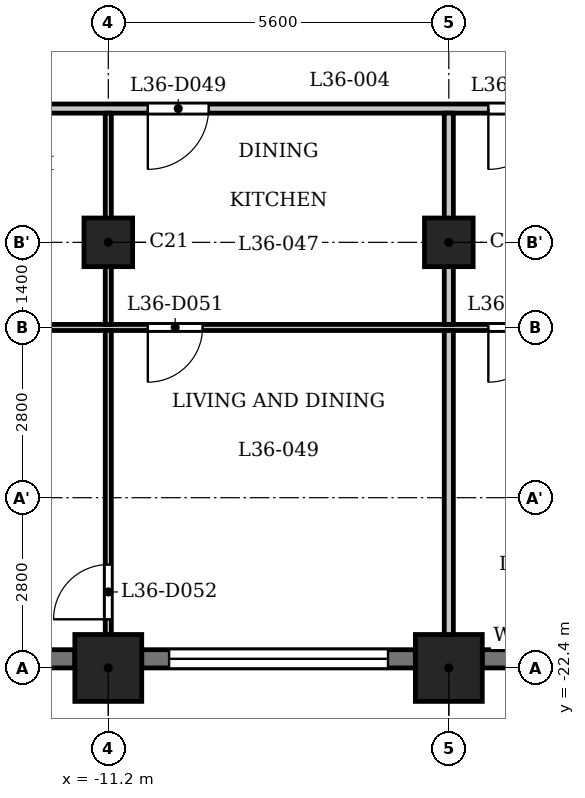
"""IFC4 building model, lengths in metres.
Left out: names, types, materials, properties, quantities, classifications, styles, units other than length and angle.
Written with IfcOpenShell. Run it as: python <this file> out.ifc"""

import sys

from ifc_helpers import new_model, si_unit, direction, frame, frame_2d, origin, origin_2d, place, context, subcontext, project, spatial, rectangle, extrude, element, fill, save


model = new_model("IFC4")
c1 = context("Model", 3, precision=1e-05, world=origin(), true_north=direction((0.0, 1.0)))
c2 = subcontext(c1, "Body", "Model", "MODEL_VIEW")
j1 = project(units=[si_unit("LENGTHUNIT", "METRE"), si_unit("PLANEANGLEUNIT", "RADIAN")], contexts=[c1])
p1 = place(None, origin())
s1 = spatial("IfcSite", under=j1, at=p1, CompositionType="ELEMENT")
p2 = place(p1, origin())
s2 = spatial("IfcBuilding", under=s1, at=p2, CompositionType="ELEMENT")
p3 = place(p2, frame((0.0, 0.0, 143.1)))
s3 = spatial("IfcBuildingStorey", under=s2, at=p3, CompositionType="ELEMENT", Elevation=143.1)
for number, where, z_axis, x_axis in (
    (1, (-11.2, -22.4, 0.0), (0.0, 0.0, 1.0), (1.0, 0.0, 0.0)),
    (2, (-5.6, -22.4, 0.0), (0.0, 0.0, 1.0), (1.0, 0.0, 0.0)),
):
    element("IfcColumn", number, at=place(p3, frame(where, z_axis=z_axis, x_axis=x_axis)), inside=s3, PredefinedType="COLUMN", context=c2, shape_type="SweptSolid", body=[
        extrude(rectangle(XDim=1.1, YDim=1.1, at=origin_2d()), origin(), (0.0, 0.0, 1.0), 3.5),
    ])
for number, where, z_axis, x_axis in (
    (3, (-11.2, -15.4, 0.0), (0.0, 0.0, 1.0), (1.0, 0.0, 0.0)),
    (4, (-5.6, -15.4, 0.0), (0.0, 0.0, 1.0), (1.0, 0.0, 0.0)),
):
    element("IfcColumn", number, at=place(p3, frame(where, z_axis=z_axis, x_axis=x_axis)), inside=s3, PredefinedType="COLUMN", context=c2, shape_type="SweptSolid", body=[
        extrude(rectangle(XDim=0.8, YDim=0.8, at=origin_2d()), origin(), (0.0, 0.0, 1.0), 3.5),
    ])
p4 = place(p3, frame((-16.25, -22.25, 0.0), z_axis=(0.0, 0.0, 1.0), x_axis=(1.0, 0.0, 0.0)))
e5 = element("IfcWall", 5, at=p4, inside=s3, PredefinedType="SOLIDWALL", context=c2, shape_type="SweptSolid", body=[
    extrude(rectangle(XDim=4.5, YDim=0.3, at=frame_2d((2.25, 0.0))), origin(), (0.0, 0.0, 1.0), 2.45),
])
p5 = place(p4, frame((0.45, 0.0, 1.2)))
e6 = element("IfcOpeningElement", 6, at=p5, cuts=e5, PredefinedType="OPENING", context=c2, shape_type="SweptSolid", body=[
    extrude(rectangle(XDim=3.6, YDim=0.95, at=frame_2d((1.8, 0.475))), frame((0.0, 0.16, 0.0), z_axis=(0.0, -1.0, 0.0), x_axis=(1.0, 0.0, 0.0)), (0.0, 0.0, 1.0), 0.32),
])
p6 = place(p3, frame((-10.65, -22.25, 0.0), z_axis=(0.0, 0.0, 1.0), x_axis=(1.0, 0.0, 0.0)))
e7 = element("IfcWall", 7, at=p6, inside=s3, PredefinedType="SOLIDWALL", context=c2, shape_type="SweptSolid", body=[
    extrude(rectangle(XDim=4.5, YDim=0.3, at=frame_2d((2.25, 0.0))), origin(), (0.0, 0.0, 1.0), 2.45),
])
p7 = place(p6, frame((0.45, 0.0, 1.2)))
e8 = element("IfcOpeningElement", 8, at=p7, cuts=e7, PredefinedType="OPENING", context=c2, shape_type="SweptSolid", body=[
    extrude(rectangle(XDim=3.6, YDim=0.95, at=frame_2d((1.8, 0.475))), frame((0.0, 0.16, 0.0), z_axis=(0.0, -1.0, 0.0), x_axis=(1.0, 0.0, 0.0)), (0.0, 0.0, 1.0), 0.32),
])
p8 = place(p3, frame((-5.05, -22.25, 0.0), z_axis=(0.0, 0.0, 1.0), x_axis=(1.0, 0.0, 0.0)))
e9 = element("IfcWall", 9, at=p8, inside=s3, PredefinedType="SOLIDWALL", context=c2, shape_type="SweptSolid", body=[
    extrude(rectangle(XDim=4.5, YDim=0.3, at=frame_2d((2.25, 0.0))), origin(), (0.0, 0.0, 1.0), 2.45),
])
p9 = place(p8, frame((0.45, 0.0, 1.2)))
e10 = element("IfcOpeningElement", 10, at=p9, cuts=e9, PredefinedType="OPENING", context=c2, shape_type="SweptSolid", body=[
    extrude(rectangle(XDim=3.6, YDim=0.95, at=frame_2d((1.8, 0.475))), frame((0.0, 0.16, 0.0), z_axis=(0.0, -1.0, 0.0), x_axis=(1.0, 0.0, 0.0)), (0.0, 0.0, 1.0), 0.32),
])
p10 = place(p3, frame((-16.725, -16.8, 0.0), z_axis=(0.0, 0.0, 1.0), x_axis=(1.0, 0.0, 0.0)))
e11 = element("IfcWall", 11, at=p10, inside=s3, PredefinedType="PARTITIONING", context=c2, shape_type="SweptSolid", body=[
    extrude(rectangle(XDim=33.45, YDim=0.1, at=frame_2d((16.725, 0.0))), origin(), (0.0, 0.0, 1.0), 3.2),
])
p11 = place(p10, frame((0.575, 0.0, 0.0)))
e12 = element("IfcOpeningElement", 12, at=p11, cuts=e11, PredefinedType="OPENING", context=c2, shape_type="SweptSolid", body=[
    extrude(rectangle(XDim=0.8, YDim=2.1, at=frame_2d((0.4, 1.05))), frame((0.0, 0.06, 0.0), z_axis=(0.0, -1.0, 0.0), x_axis=(1.0, 0.0, 0.0)), (0.0, 0.0, 1.0), 0.12),
])
p12 = place(p10, frame((6.175, 0.0, 0.0)))
e13 = element("IfcOpeningElement", 13, at=p12, cuts=e11, PredefinedType="OPENING", context=c2, shape_type="SweptSolid", body=[
    extrude(rectangle(XDim=0.9, YDim=2.1, at=frame_2d((0.45, 1.05))), frame((0.0, 0.06, 0.0), z_axis=(0.0, -1.0, 0.0), x_axis=(1.0, 0.0, 0.0)), (0.0, 0.0, 1.0), 0.12),
])
p13 = place(p10, frame((15.275, 0.0, 0.0)))
e14 = element("IfcOpeningElement", 14, at=p13, cuts=e11, PredefinedType="OPENING", context=c2, shape_type="SweptSolid", body=[
    extrude(rectangle(XDim=0.8, YDim=2.1, at=frame_2d((0.4, 1.05))), frame((0.0, 0.06, 0.0), z_axis=(0.0, -1.0, 0.0), x_axis=(1.0, 0.0, 0.0)), (0.0, 0.0, 1.0), 0.12),
])
p14 = place(p10, frame((11.775, 0.0, 0.0)))
e15 = element("IfcOpeningElement", 15, at=p14, cuts=e11, PredefinedType="OPENING", context=c2, shape_type="SweptSolid", body=[
    extrude(rectangle(XDim=0.9, YDim=2.1, at=frame_2d((0.45, 1.05))), frame((0.0, 0.06, 0.0), z_axis=(0.0, -1.0, 0.0), x_axis=(1.0, 0.0, 0.0)), (0.0, 0.0, 1.0), 0.12),
])
p15 = place(p10, frame((17.275, 0.0, 0.0)))
e16 = element("IfcOpeningElement", 16, at=p15, cuts=e11, PredefinedType="OPENING", context=c2, shape_type="SweptSolid", body=[
    extrude(rectangle(XDim=0.8, YDim=2.1, at=frame_2d((0.4, 1.05))), frame((0.0, 0.06, 0.0), z_axis=(0.0, -1.0, 0.0), x_axis=(1.0, 0.0, 0.0)), (0.0, 0.0, 1.0), 0.12),
])
p16 = place(p10, frame((20.775, 0.0, 0.0)))
e17 = element("IfcOpeningElement", 17, at=p16, cuts=e11, PredefinedType="OPENING", context=c2, shape_type="SweptSolid", body=[
    extrude(rectangle(XDim=0.9, YDim=2.1, at=frame_2d((0.45, 1.05))), frame((0.0, 0.06, 0.0), z_axis=(0.0, -1.0, 0.0), x_axis=(1.0, 0.0, 0.0)), (0.0, 0.0, 1.0), 0.12),
])
p17 = place(p10, frame((31.575, 0.0, 0.0)))
e18 = element("IfcOpeningElement", 18, at=p17, cuts=e11, PredefinedType="OPENING", context=c2, shape_type="SweptSolid", body=[
    extrude(rectangle(XDim=0.8, YDim=2.1, at=frame_2d((0.4, 1.05))), frame((0.0, 0.06, 0.0), z_axis=(0.0, -1.0, 0.0), x_axis=(1.0, 0.0, 0.0)), (0.0, 0.0, 1.0), 0.12),
])
p18 = place(p10, frame((28.575, 0.0, 0.0)))
e19 = element("IfcOpeningElement", 19, at=p18, cuts=e11, PredefinedType="OPENING", context=c2, shape_type="SweptSolid", body=[
    extrude(rectangle(XDim=0.9, YDim=2.1, at=frame_2d((0.45, 1.05))), frame((0.0, 0.06, 0.0), z_axis=(0.0, -1.0, 0.0), x_axis=(1.0, 0.0, 0.0)), (0.0, 0.0, 1.0), 0.12),
])
p19 = place(p10, frame((23.725, 0.0, 0.0)))
e20 = element("IfcOpeningElement", 20, at=p19, cuts=e11, PredefinedType="OPENING", context=c2, shape_type="SweptSolid", body=[
    extrude(rectangle(XDim=0.9, YDim=2.1, at=frame_2d((0.45, 1.05))), frame((0.0, 0.06, 0.0), z_axis=(0.0, -1.0, 0.0), x_axis=(1.0, 0.0, 0.0)), (0.0, 0.0, 1.0), 0.12),
])
p20 = place(p10, frame((26.225, 0.0, 0.0)))
e21 = element("IfcOpeningElement", 21, at=p20, cuts=e11, PredefinedType="OPENING", context=c2, shape_type="SweptSolid", body=[
    extrude(rectangle(XDim=0.9, YDim=2.1, at=frame_2d((0.45, 1.05))), frame((0.0, 0.06, 0.0), z_axis=(0.0, -1.0, 0.0), x_axis=(1.0, 0.0, 0.0)), (0.0, 0.0, 1.0), 0.12),
])
p21 = place(p3, frame((-17.4, -13.2, 0.0), z_axis=(0.0, 0.0, 1.0), x_axis=(1.0, 0.0, 0.0)))
e22 = element("IfcWall", 22, at=p21, inside=s3, PredefinedType="PARTITIONING", context=c2, shape_type="SweptSolid", body=[
    extrude(rectangle(XDim=34.8, YDim=0.15, at=frame_2d((17.4, 0.0))), origin(), (0.0, 0.0, 1.0), 3.2),
])
p22 = place(p21, frame((0.15, 0.0, 0.0)))
e23 = element("IfcOpeningElement", 23, at=p22, cuts=e22, PredefinedType="OPENING", context=c2, shape_type="SweptSolid", body=[
    extrude(rectangle(XDim=1.0, YDim=2.1, at=frame_2d((0.5, 1.05))), frame((0.0, 0.085, 0.0), z_axis=(0.0, -1.0, 0.0), x_axis=(1.0, 0.0, 0.0)), (0.0, 0.0, 1.0), 0.17),
])
p23 = place(p21, frame((33.55, 0.0, 0.0)))
e24 = element("IfcOpeningElement", 24, at=p23, cuts=e22, PredefinedType="OPENING", context=c2, shape_type="SweptSolid", body=[
    extrude(rectangle(XDim=1.0, YDim=2.1, at=frame_2d((0.5, 1.05))), frame((0.0, 0.085, 0.0), z_axis=(0.0, -1.0, 0.0), x_axis=(1.0, 0.0, 0.0)), (0.0, 0.0, 1.0), 0.17),
])
p24 = place(p21, frame((6.85, 0.0, 0.0)))
e25 = element("IfcOpeningElement", 25, at=p24, cuts=e22, PredefinedType="OPENING", context=c2, shape_type="SweptSolid", body=[
    extrude(rectangle(XDim=1.0, YDim=2.1, at=frame_2d((0.5, 1.05))), frame((0.0, 0.085, 0.0), z_axis=(0.0, -1.0, 0.0), x_axis=(1.0, 0.0, 0.0)), (0.0, 0.0, 1.0), 0.17),
])
p25 = place(p21, frame((12.45, 0.0, 0.0)))
e26 = element("IfcOpeningElement", 26, at=p25, cuts=e22, PredefinedType="OPENING", context=c2, shape_type="SweptSolid", body=[
    extrude(rectangle(XDim=1.0, YDim=2.1, at=frame_2d((0.5, 1.05))), frame((0.0, 0.085, 0.0), z_axis=(0.0, -1.0, 0.0), x_axis=(1.0, 0.0, 0.0)), (0.0, 0.0, 1.0), 0.17),
])
p26 = place(p21, frame((21.3, 0.0, 0.0)))
e27 = element("IfcOpeningElement", 27, at=p26, cuts=e22, PredefinedType="OPENING", context=c2, shape_type="SweptSolid", body=[
    extrude(rectangle(XDim=1.0, YDim=2.1, at=frame_2d((0.5, 1.05))), frame((0.0, 0.085, 0.0), z_axis=(0.0, -1.0, 0.0), x_axis=(1.0, 0.0, 0.0)), (0.0, 0.0, 1.0), 0.17),
])
p27 = place(p21, frame((26.9, 0.0, 0.0)))
e28 = element("IfcOpeningElement", 28, at=p27, cuts=e22, PredefinedType="OPENING", context=c2, shape_type="SweptSolid", body=[
    extrude(rectangle(XDim=1.0, YDim=2.1, at=frame_2d((0.5, 1.05))), frame((0.0, 0.085, 0.0), z_axis=(0.0, -1.0, 0.0), x_axis=(1.0, 0.0, 0.0)), (0.0, 0.0, 1.0), 0.17),
])
p28 = place(p3, frame((-11.2, -22.93, 0.0), z_axis=(0.0, 0.0, 1.0), x_axis=(0.0, 1.0, 0.0)))
e29 = element("IfcWall", 29, at=p28, inside=s3, PredefinedType="PARTITIONING", context=c2, shape_type="SweptSolid", body=[
    extrude(rectangle(XDim=6.08, YDim=0.1, at=frame_2d((3.04, 0.0))), origin(), (0.0, 0.0, 1.0), 3.2),
])
p29 = place(p28, frame((1.33, 0.0, 0.0)))
e30 = element("IfcOpeningElement", 30, at=p29, cuts=e29, PredefinedType="OPENING", context=c2, shape_type="SweptSolid", body=[
    extrude(rectangle(XDim=0.9, YDim=2.1, at=frame_2d((0.45, 1.05))), frame((0.0, 0.06, 0.0), z_axis=(0.0, -1.0, 0.0), x_axis=(1.0, 0.0, 0.0)), (0.0, 0.0, 1.0), 0.12),
])
p30 = place(p3, frame((-11.2, -16.75, 0.0), z_axis=(0.0, 0.0, 1.0), x_axis=(0.0, 1.0, 0.0)))
e31 = element("IfcWall", 31, at=p30, inside=s3, PredefinedType="PARTITIONING", context=c2, shape_type="SweptSolid", body=[
    extrude(rectangle(XDim=3.475, YDim=0.1, at=frame_2d((1.738, 0.0))), origin(), (0.0, 0.0, 1.0), 3.2),
])
p31 = place(p3, frame((-5.6, -22.93, 0.0), z_axis=(0.0, 0.0, 1.0), x_axis=(0.0, 1.0, 0.0)))
e32 = element("IfcWall", 32, at=p31, inside=s3, PredefinedType="PARTITIONING", context=c2, shape_type="SweptSolid", body=[
    extrude(rectangle(XDim=6.08, YDim=0.15, at=frame_2d((3.04, 0.0))), origin(), (0.0, 0.0, 1.0), 3.2),
])
p32 = place(p3, frame((-5.6, -16.75, 0.0), z_axis=(0.0, 0.0, 1.0), x_axis=(0.0, 1.0, 0.0)))
e33 = element("IfcWall", 33, at=p32, inside=s3, PredefinedType="PARTITIONING", context=c2, shape_type="SweptSolid", body=[
    extrude(rectangle(XDim=3.475, YDim=0.15, at=frame_2d((1.738, 0.0))), origin(), (0.0, 0.0, 1.0), 3.2),
])
p33 = place(p24, origin())
e34 = element("IfcDoor", 34, at=p33, inside=s3, OperationType="SINGLE_SWING_LEFT", PredefinedType="DOOR", context=c2, shape_type="SweptSolid", body=[
    extrude(rectangle(XDim=1.0, YDim=2.1, at=frame_2d((0.5, 1.05))), frame((0.0, 0.025, 0.0), z_axis=(0.0, -1.0, 0.0), x_axis=(1.0, 0.0, 0.0)), (0.0, 0.0, 1.0), 0.05),
])
fill(e25, e34)
p34 = place(p12, origin())
e35 = element("IfcDoor", 35, at=p34, inside=s3, OperationType="SINGLE_SWING_LEFT", PredefinedType="DOOR", context=c2, shape_type="SweptSolid", body=[
    extrude(rectangle(XDim=0.9, YDim=2.1, at=frame_2d((0.45, 1.05))), frame((0.0, 0.025, 0.0), z_axis=(0.0, -1.0, 0.0), x_axis=(1.0, 0.0, 0.0)), (0.0, 0.0, 1.0), 0.05),
])
fill(e13, e35)
p35 = place(p29, origin())
e36 = element("IfcDoor", 36, at=p35, inside=s3, OperationType="SINGLE_SWING_RIGHT", PredefinedType="DOOR", context=c2, shape_type="SweptSolid", body=[
    extrude(rectangle(XDim=0.9, YDim=2.1, at=frame_2d((0.45, 1.05))), frame((0.0, 0.025, 0.0), z_axis=(0.0, -1.0, 0.0), x_axis=(1.0, 0.0, 0.0)), (0.0, 0.0, 1.0), 0.05),
])
fill(e30, e36)
p36 = place(p25, origin())
e37 = element("IfcDoor", 37, at=p36, inside=s3, OperationType="SINGLE_SWING_LEFT", PredefinedType="DOOR", context=c2, shape_type="SweptSolid", body=[
    extrude(rectangle(XDim=1.0, YDim=2.1, at=frame_2d((0.5, 1.05))), frame((0.0, 0.025, 0.0), z_axis=(0.0, -1.0, 0.0), x_axis=(1.0, 0.0, 0.0)), (0.0, 0.0, 1.0), 0.05),
])
fill(e26, e37)
p37 = place(p14, origin())
e38 = element("IfcDoor", 38, at=p37, inside=s3, OperationType="SINGLE_SWING_LEFT", PredefinedType="DOOR", context=c2, shape_type="SweptSolid", body=[
    extrude(rectangle(XDim=0.9, YDim=2.1, at=frame_2d((0.45, 1.05))), frame((0.0, 0.025, 0.0), z_axis=(0.0, -1.0, 0.0), x_axis=(1.0, 0.0, 0.0)), (0.0, 0.0, 1.0), 0.05),
])
fill(e15, e38)
p38 = place(p7, origin())
e39 = element("IfcWindow", 39, at=p38, inside=s3, PartitioningType="SINGLE_PANEL", PredefinedType="WINDOW", context=c2, shape_type="SweptSolid", body=[
    extrude(rectangle(XDim=3.6, YDim=0.95, at=frame_2d((1.8, 0.475))), frame((0.0, 0.03, 0.0), z_axis=(0.0, -1.0, 0.0), x_axis=(1.0, 0.0, 0.0)), (0.0, 0.0, 1.0), 0.06),
])
fill(e8, e39)
save(model, sys.argv[1])
